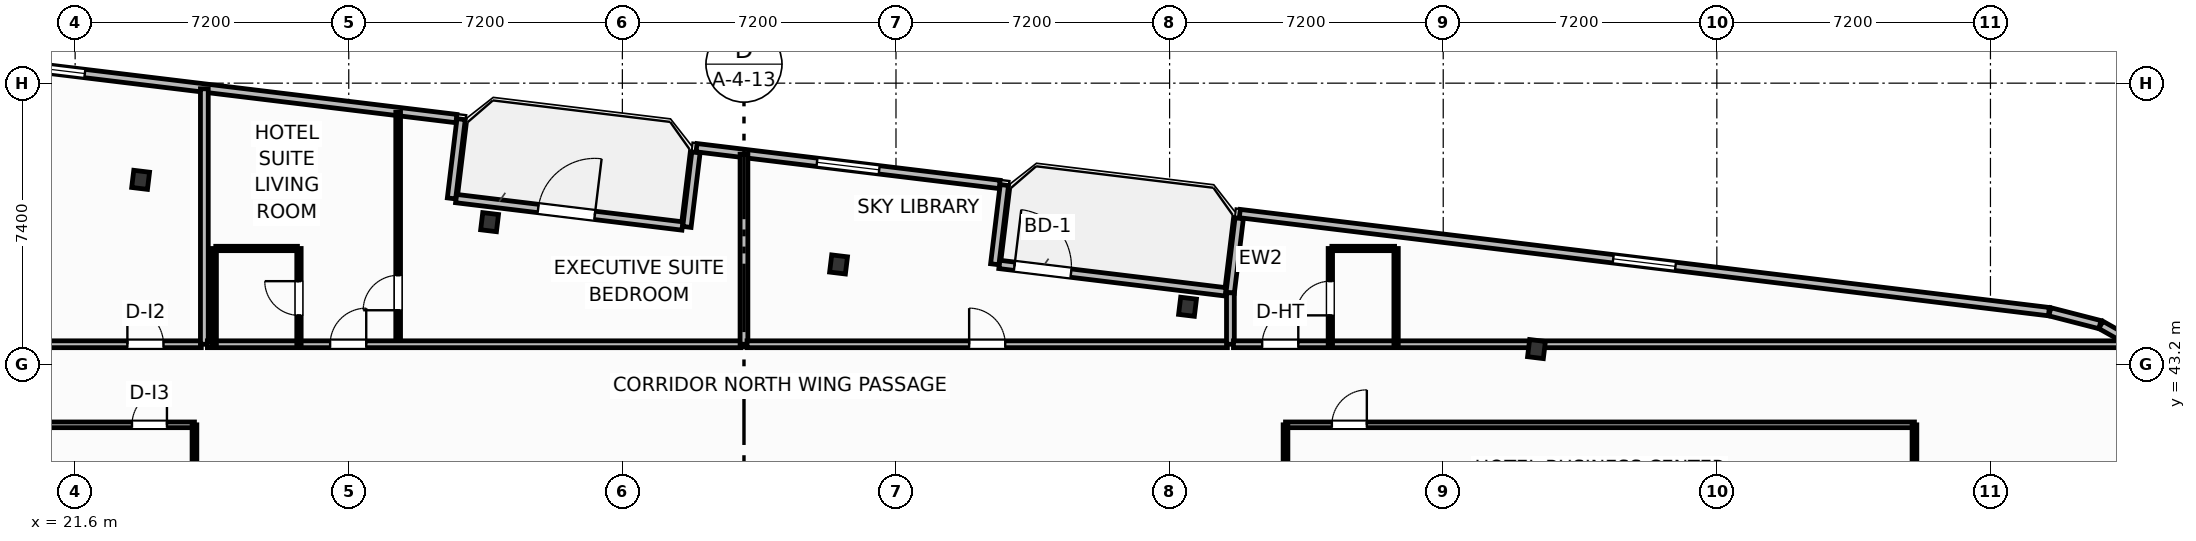
"""IFC4 building model, lengths in metres.
Left out: names, types, materials, properties, quantities, classifications, styles, units other than length and angle.
Written with IfcOpenShell. Run it as: python <this file> out.ifc"""

import sys

from ifc_helpers import new_model, si_unit, direction, frame, frame_2d, origin, origin_2d, place, context, subcontext, project, spatial, rectangle, i_section, extrude, element, fill, save


model = new_model("IFC4")
c1 = context("Model", 3, precision=1e-05, world=origin(), true_north=direction((0.0, 1.0)))
c2 = subcontext(c1, "Body", "Model", "MODEL_VIEW")
j1 = project(units=[si_unit("LENGTHUNIT", "METRE"), si_unit("PLANEANGLEUNIT", "RADIAN")], contexts=[c1])
p1 = place(None, origin())
s1 = spatial("IfcSite", under=j1, at=p1, CompositionType="ELEMENT")
p2 = place(p1, origin())
s2 = spatial("IfcBuilding", under=s1, at=p2, CompositionType="ELEMENT")
p3 = place(p2, frame((0.0, 0.0, 143.9)))
s3 = spatial("IfcBuildingStorey", under=s2, at=p3, CompositionType="ELEMENT", Elevation=143.9)
for number, where, z_axis, x_axis in (
    (1, (60.054, 43.603, 0.0), (0.0, 0.0, 1.0), (0.993, -0.12, 0.0)),
    (2, (50.872, 44.717, 0.0), (0.0, 0.0, 1.0), (0.993, -0.12, 0.0)),
    (3, (41.689, 45.83, 0.0), (0.0, 0.0, 1.0), (0.993, -0.12, 0.0)),
    (4, (32.506, 46.943, 0.0), (0.0, 0.0, 1.0), (0.993, -0.12, 0.0)),
    (5, (23.323, 48.056, 0.0), (0.0, 0.0, 1.0), (0.993, -0.12, 0.0)),
):
    element("IfcColumn", number, at=place(p3, frame(where, z_axis=z_axis, x_axis=x_axis)), inside=s3, PredefinedType="COLUMN", context=c2, shape_type="SweptSolid", body=[
        extrude(i_section(OverallWidth=0.418, OverallDepth=0.455, WebThickness=0.042, FlangeThickness=0.068, FilletRadius=0.025, at=origin_2d()), origin(), (0.0, 0.0, 1.0), 3.7),
    ])
p4 = place(p3, frame((31.624, 47.563, 0.0), z_axis=(0.0, 0.0, 1.0), x_axis=(0.992729951822, -0.120362962556, 0.0)))
e6 = element("IfcWall", 6, at=p4, inside=s3, PredefinedType="SOLIDWALL", context=c2, shape_type="SweptSolid", body=[
    extrude(rectangle(XDim=6.0, YDim=0.22, at=frame_2d((3.0, 0.0))), origin(), (0.0, 0.0, 1.0), 2.73),
])
p5 = place(p4, frame((2.176, 0.0, 0.0)))
e7 = element("IfcOpeningElement", 7, at=p5, cuts=e6, PredefinedType="OPENING", context=c2, shape_type="SweptSolid", body=[
    extrude(rectangle(XDim=1.5, YDim=2.25, at=frame_2d((0.75, 1.125))), frame((0.0, 0.12, 0.0), z_axis=(0.0, -1.0, 0.0), x_axis=(1.0, 0.0, 0.0)), (0.0, 0.0, 1.0), 0.24),
])
p6 = place(p3, frame((45.92, 45.831, 0.0), z_axis=(0.0, 0.0, 1.0), x_axis=(0.992729951822, -0.120362962556, 0.0)))
e8 = element("IfcWall", 8, at=p6, inside=s3, PredefinedType="SOLIDWALL", context=c2, shape_type="SweptSolid", body=[
    extrude(rectangle(XDim=6.0, YDim=0.22, at=frame_2d((3.0, 0.0))), origin(), (0.0, 0.0, 1.0), 2.73),
])
p7 = place(p6, frame((0.4, 0.0, 0.0)))
e9 = element("IfcOpeningElement", 9, at=p7, cuts=e8, PredefinedType="OPENING", context=c2, shape_type="SweptSolid", body=[
    extrude(rectangle(XDim=1.5, YDim=2.25, at=frame_2d((0.75, 1.125))), frame((0.0, 0.12, 0.0), z_axis=(0.0, -1.0, 0.0), x_axis=(1.0, 0.0, 0.0)), (0.0, 0.0, 1.0), 0.24),
])
p8 = place(p3, frame((76.084, 43.575, 0.0), z_axis=(0.0, 0.0, 1.0), x_axis=(-0.871093268227, 0.491117621399, 0.0)))
e10 = element("IfcWall", 10, at=p8, inside=s3, PredefinedType="SOLIDWALL", context=c2, shape_type="SweptSolid", body=[
    extrude(rectangle(XDim=1.353, YDim=0.22, at=frame_2d((0.677, 0.0))), origin(), (0.0, 0.0, 1.0), 2.73),
])
p9 = place(p3, frame((74.881, 44.246, 0.0), z_axis=(0.0, 0.0, 1.0), x_axis=(-0.968549775063, 0.248819881091, 0.0)))
e11 = element("IfcWall", 11, at=p9, inside=s3, PredefinedType="SOLIDWALL", context=c2, shape_type="SweptSolid", body=[
    extrude(rectangle(XDim=1.361, YDim=0.22, at=frame_2d((0.68, 0.0))), origin(), (0.0, 0.0, 1.0), 2.73),
])
p10 = place(p3, frame((73.538, 44.588, 0.0), z_axis=(0.0, 0.0, 1.0), x_axis=(-0.992733493583, 0.120333747213, 0.0)))
e12 = element("IfcWall", 12, at=p10, inside=s3, PredefinedType="SOLIDWALL", context=c2, shape_type="SweptSolid", body=[
    extrude(rectangle(XDim=21.447, YDim=0.22, at=frame_2d((10.724, 0.0))), origin(), (0.0, 0.0, 1.0), 2.73),
])
p11 = place(p10, frame((9.899, 0.0, 0.8)))
e13 = element("IfcOpeningElement", 13, at=p11, cuts=e12, PredefinedType="OPENING", context=c2, shape_type="SweptSolid", body=[
    extrude(rectangle(XDim=1.65, YDim=1.65, at=frame_2d((0.825, 0.825))), frame((0.0, 0.12, 0.0), z_axis=(0.0, -1.0, 0.0), x_axis=(1.0, 0.0, 0.0)), (0.0, 0.0, 1.0), 0.24),
])
p12 = place(p3, frame((52.231, 47.045, 0.0), z_axis=(0.0, 0.0, 1.0), x_axis=(-0.120275992932, -0.992740492538, 0.0)))
e14 = element("IfcWall", 14, at=p12, inside=s3, PredefinedType="SOLIDWALL", context=c2, shape_type="SweptSolid", body=[
    extrude(rectangle(XDim=1.975, YDim=0.22, at=frame_2d((0.988, 0.0))), origin(), (0.0, 0.0, 1.0), 2.73),
])
p13 = place(p3, frame((45.799, 45.835, 0.0), z_axis=(0.0, 0.0, 1.0), x_axis=(0.120314009587, 0.992735885871, 0.0)))
e15 = element("IfcWall", 15, at=p13, inside=s3, PredefinedType="SOLIDWALL", context=c2, shape_type="SweptSolid", body=[
    extrude(rectangle(XDim=2.1, YDim=0.22, at=frame_2d((1.05, 0.0))), origin(), (0.0, 0.0, 1.0), 2.73),
])
p14 = place(p3, frame((45.928, 47.935, 0.0), z_axis=(0.0, 0.0, 1.0), x_axis=(-0.992730591876, 0.120357683402, 0.0)))
e16 = element("IfcWall", 16, at=p14, inside=s3, PredefinedType="SOLIDWALL", context=c2, shape_type="SweptSolid", body=[
    extrude(rectangle(XDim=8.035, YDim=0.22, at=frame_2d((4.017, 0.0))), origin(), (0.0, 0.0, 1.0), 2.73),
])
p15 = place(p14, frame((3.192, 0.0, 0.8)))
e17 = element("IfcOpeningElement", 17, at=p15, cuts=e16, PredefinedType="OPENING", context=c2, shape_type="SweptSolid", body=[
    extrude(rectangle(XDim=1.65, YDim=1.65, at=frame_2d((0.825, 0.825))), frame((0.0, 0.12, 0.0), z_axis=(0.0, -1.0, 0.0), x_axis=(1.0, 0.0, 0.0)), (0.0, 0.0, 1.0), 0.24),
])
p16 = place(p3, frame((37.936, 48.778, 0.0), z_axis=(0.0, 0.0, 1.0), x_axis=(-0.120397815541, -0.992725725472, 0.0)))
e18 = element("IfcWall", 18, at=p16, inside=s3, PredefinedType="SOLIDWALL", context=c2, shape_type="SweptSolid", body=[
    extrude(rectangle(XDim=1.975, YDim=0.22, at=frame_2d((0.988, 0.0))), origin(), (0.0, 0.0, 1.0), 2.73),
])
p17 = place(p3, frame((31.504, 47.568, 0.0), z_axis=(0.0, 0.0, 1.0), x_axis=(0.120341784665, 0.992732519294, 0.0)))
e19 = element("IfcWall", 19, at=p17, inside=s3, PredefinedType="SOLIDWALL", context=c2, shape_type="SweptSolid", body=[
    extrude(rectangle(XDim=2.1, YDim=0.22, at=frame_2d((1.05, 0.0))), origin(), (0.0, 0.0, 1.0), 2.73),
])
p18 = place(p3, frame((31.633, 49.668, 0.0), z_axis=(0.0, 0.0, 1.0), x_axis=(-0.992731670483, 0.120348786531, 0.0)))
e20 = element("IfcWall", 20, at=p18, inside=s3, PredefinedType="SOLIDWALL", context=c2, shape_type="SweptSolid", body=[
    extrude(rectangle(XDim=21.347, YDim=0.22, at=frame_2d((10.674, 0.0))), origin(), (0.0, 0.0, 1.0), 2.73),
])
p19 = place(p18, frame((9.849, 0.0, 0.8)))
e21 = element("IfcOpeningElement", 21, at=p19, cuts=e20, PredefinedType="OPENING", context=c2, shape_type="SweptSolid", body=[
    extrude(rectangle(XDim=1.65, YDim=1.65, at=frame_2d((0.825, 0.825))), frame((0.0, 0.12, 0.0), z_axis=(0.0, -1.0, 0.0), x_axis=(1.0, 0.0, 0.0)), (0.0, 0.0, 1.0), 0.24),
])
p20 = place(p3, frame((5.0, 41.61, 0.0), z_axis=(0.0, 0.0, 1.0), x_axis=(1.0, 0.0, 0.0)))
e22 = element("IfcWall", 22, at=p20, inside=s3, PredefinedType="PARTITIONING", context=c2, shape_type="SweptSolid", body=[
    extrude(rectangle(XDim=19.74, YDim=0.15, at=frame_2d((9.87, 0.0))), origin(), (0.0, 0.0, 1.0), 3.45),
])
p21 = place(p20, frame((18.096, 0.0, 0.0)))
e23 = element("IfcOpeningElement", 23, at=p21, cuts=e22, PredefinedType="OPENING", context=c2, shape_type="SweptSolid", body=[
    extrude(rectangle(XDim=0.92, YDim=2.05, at=frame_2d((0.46, 1.025))), frame((0.0, 0.085, 0.0), z_axis=(0.0, -1.0, 0.0), x_axis=(1.0, 0.0, 0.0)), (0.0, 0.0, 1.0), 0.17),
])
p22 = place(p3, frame((24.74, 39.3, 0.0), z_axis=(0.0, 0.0, 1.0), x_axis=(0.0, 1.0, 0.0)))
e24 = element("IfcWall", 24, at=p22, inside=s3, PredefinedType="PARTITIONING", context=c2, shape_type="SweptSolid", body=[
    extrude(rectangle(XDim=2.31, YDim=0.125, at=frame_2d((1.155, 0.0))), origin(), (0.0, 0.0, 1.0), 3.45),
])
p23 = place(p3, frame((53.45, 41.61, 0.0), z_axis=(0.0, 0.0, 1.0), x_axis=(1.0, 0.0, 0.0)))
e25 = element("IfcWall", 25, at=p23, inside=s3, PredefinedType="PARTITIONING", context=c2, shape_type="SweptSolid", body=[
    extrude(rectangle(XDim=16.55, YDim=0.15, at=frame_2d((8.275, 0.0))), origin(), (0.0, 0.0, 1.0), 3.45),
])
p24 = place(p23, frame((1.22, 0.0, 0.0)))
e26 = element("IfcOpeningElement", 26, at=p24, cuts=e25, PredefinedType="OPENING", context=c2, shape_type="SweptSolid", body=[
    extrude(rectangle(XDim=0.92, YDim=2.05, at=frame_2d((0.46, 1.025))), frame((0.0, 0.085, 0.0), z_axis=(0.0, -1.0, 0.0), x_axis=(1.0, 0.0, 0.0)), (0.0, 0.0, 1.0), 0.17),
])
for number, where, z_axis, x_axis in (
    (27, (53.45, 39.3, 0.0), (0.0, 0.0, 1.0), (0.0, 1.0, 0.0)),
    (28, (70.0, 39.3, 0.0), (0.0, 0.0, 1.0), (0.0, 1.0, 0.0)),
):
    element("IfcWall", number, at=place(p3, frame(where, z_axis=z_axis, x_axis=x_axis)), inside=s3, PredefinedType="PARTITIONING", context=c2, shape_type="SweptSolid", body=[
        extrude(rectangle(XDim=2.31, YDim=0.125, at=frame_2d((1.155, 0.0))), origin(), (0.0, 0.0, 1.0), 3.45),
    ])
p25 = place(p3, frame((4.143, 43.73, 0.0), z_axis=(0.0, 0.0, 1.0), x_axis=(1.0, 0.0, 0.0)))
e29 = element("IfcWall", 29, at=p25, inside=s3, PredefinedType="PARTITIONING", context=c2, shape_type="SweptSolid", body=[
    extrude(rectangle(XDim=20.777, YDim=0.18, at=frame_2d((10.389, 0.0))), origin(), (0.0, 0.0, 1.0), 3.45),
])
p26 = place(p25, frame((18.832, 0.0, 0.0)))
e30 = element("IfcOpeningElement", 30, at=p26, cuts=e29, PredefinedType="OPENING", context=c2, shape_type="SweptSolid", body=[
    extrude(rectangle(XDim=0.95, YDim=2.05, at=frame_2d((0.475, 1.025))), frame((0.0, 0.1, 0.0), z_axis=(0.0, -1.0, 0.0), x_axis=(1.0, 0.0, 0.0)), (0.0, 0.0, 1.0), 0.2),
])
p27 = place(p3, frame((25.0, 43.73, 0.0), z_axis=(0.0, 0.0, 1.0), x_axis=(0.0, 1.0, 0.0)))
e31 = element("IfcWall", 31, at=p27, inside=s3, PredefinedType="PARTITIONING", context=c2, shape_type="SweptSolid", body=[
    extrude(rectangle(XDim=6.722, YDim=0.205, at=frame_2d((3.361, 0.0))), origin(), (0.0, 0.0, 1.0), 3.45),
])
p28 = place(p3, frame((30.1, 43.73, 0.0), z_axis=(0.0, 0.0, 1.0), x_axis=(0.0, 1.0, 0.0)))
e32 = element("IfcWall", 32, at=p28, inside=s3, PredefinedType="PARTITIONING", context=c2, shape_type="SweptSolid", body=[
    extrude(rectangle(XDim=6.104, YDim=0.125, at=frame_2d((3.052, 0.0))), origin(), (0.0, 0.0, 1.0), 3.45),
])
p29 = place(p28, frame((0.895, 0.0, 0.0)))
e33 = element("IfcOpeningElement", 33, at=p29, cuts=e32, PredefinedType="OPENING", context=c2, shape_type="SweptSolid", body=[
    extrude(rectangle(XDim=0.92, YDim=2.05, at=frame_2d((0.46, 1.025))), frame((0.0, 0.073, 0.0), z_axis=(0.0, -1.0, 0.0), x_axis=(1.0, 0.0, 0.0)), (0.0, 0.0, 1.0), 0.145),
])
p30 = place(p3, frame((25.08, 43.73, 0.0), z_axis=(0.0, 0.0, 1.0), x_axis=(1.0, 0.0, 0.0)))
e34 = element("IfcWall", 34, at=p30, inside=s3, PredefinedType="PARTITIONING", context=c2, shape_type="SweptSolid", body=[
    extrude(rectangle(XDim=14.04, YDim=0.18, at=frame_2d((7.02, 0.0))), origin(), (0.0, 0.0, 1.0), 2.972),
])
p31 = place(p30, frame((3.23, 0.0, 0.0)))
e35 = element("IfcOpeningElement", 35, at=p31, cuts=e34, PredefinedType="OPENING", context=c2, shape_type="SweptSolid", body=[
    extrude(rectangle(XDim=0.95, YDim=2.15, at=frame_2d((0.475, 1.075))), frame((0.0, 0.1, 0.0), z_axis=(0.0, -1.0, 0.0), x_axis=(1.0, 0.0, 0.0)), (0.0, 0.0, 1.0), 0.2),
])
p32 = place(p3, frame((25.3, 46.25, 0.0), z_axis=(0.0, 0.0, 1.0), x_axis=(1.0, 0.0, 0.0)))
e36 = element("IfcWall", 36, at=p32, inside=s3, PredefinedType="PARTITIONING", context=c2, shape_type="SweptSolid", body=[
    extrude(rectangle(XDim=2.15, YDim=0.115, at=frame_2d((1.075, 0.0))), origin(), (0.0, 0.0, 1.0), 3.45),
])
p33 = place(p3, frame((27.49, 43.73, 0.0), z_axis=(0.0, 0.0, 1.0), x_axis=(0.0, 1.0, 0.0)))
e37 = element("IfcWall", 37, at=p33, inside=s3, PredefinedType="PARTITIONING", context=c2, shape_type="SweptSolid", body=[
    extrude(rectangle(XDim=2.52, YDim=0.115, at=frame_2d((1.26, 0.0))), origin(), (0.0, 0.0, 1.0), 3.45),
])
p34 = place(p33, frame((0.76, 0.0, 0.0)))
e38 = element("IfcOpeningElement", 38, at=p34, cuts=e37, PredefinedType="OPENING", context=c2, shape_type="SweptSolid", body=[
    extrude(rectangle(XDim=0.9, YDim=2.05, at=frame_2d((0.45, 1.025))), frame((0.0, 0.067, 0.0), z_axis=(0.0, -1.0, 0.0), x_axis=(1.0, 0.0, 0.0)), (0.0, 0.0, 1.0), 0.135),
])
p35 = place(p3, frame((25.26, 43.73, 0.0), z_axis=(0.0, 0.0, 1.0), x_axis=(0.0, 1.0, 0.0)))
e39 = element("IfcWall", 39, at=p35, inside=s3, PredefinedType="PARTITIONING", context=c2, shape_type="SweptSolid", body=[
    extrude(rectangle(XDim=2.52, YDim=0.115, at=frame_2d((1.26, 0.0))), origin(), (0.0, 0.0, 1.0), 3.45),
])
p36 = place(p3, frame((39.2, 43.73, 0.0), z_axis=(0.0, 0.0, 1.0), x_axis=(0.0, 1.0, 0.0)))
e40 = element("IfcWall", 40, at=p36, inside=s3, PredefinedType="PARTITIONING", context=c2, shape_type="SweptSolid", body=[
    extrude(rectangle(XDim=5.0, YDim=0.205, at=frame_2d((2.5, 0.0))), origin(), (0.0, 0.0, 1.0), 3.45),
])
p37 = place(p3, frame((39.28, 43.73, 0.0), z_axis=(0.0, 0.0, 1.0), x_axis=(1.0, 0.0, 0.0)))
e41 = element("IfcWall", 41, at=p37, inside=s3, PredefinedType="PARTITIONING", context=c2, shape_type="SweptSolid", body=[
    extrude(rectangle(XDim=12.64, YDim=0.18, at=frame_2d((6.32, 0.0))), origin(), (0.0, 0.0, 1.0), 2.972),
])
p38 = place(p37, frame((5.845, 0.0, 0.0)))
e42 = element("IfcOpeningElement", 42, at=p38, cuts=e41, PredefinedType="OPENING", context=c2, shape_type="SweptSolid", body=[
    extrude(rectangle(XDim=0.95, YDim=2.05, at=frame_2d((0.475, 1.025))), frame((0.0, 0.1, 0.0), z_axis=(0.0, -1.0, 0.0), x_axis=(1.0, 0.0, 0.0)), (0.0, 0.0, 1.0), 0.2),
])
p39 = place(p3, frame((52.0, 43.73, 0.0), z_axis=(0.0, 0.0, 1.0), x_axis=(0.0, 1.0, 0.0)))
e43 = element("IfcWall", 43, at=p39, inside=s3, PredefinedType="PARTITIONING", context=c2, shape_type="SweptSolid", body=[
    extrude(rectangle(XDim=1.354, YDim=0.205, at=frame_2d((0.677, 0.0))), origin(), (0.0, 0.0, 1.0), 3.45),
])
p40 = place(p3, frame((52.08, 43.73, 0.0), z_axis=(0.0, 0.0, 1.0), x_axis=(1.0, 0.0, 0.0)))
e44 = element("IfcWall", 44, at=p40, inside=s3, PredefinedType="PARTITIONING", context=c2, shape_type="SweptSolid", body=[
    extrude(rectangle(XDim=23.689, YDim=0.18, at=frame_2d((11.845, 0.0))), origin(), (0.0, 0.0, 1.0), 2.824),
])
p41 = place(p40, frame((0.756, 0.0, 0.0)))
e45 = element("IfcOpeningElement", 45, at=p41, cuts=e44, PredefinedType="OPENING", context=c2, shape_type="SweptSolid", body=[
    extrude(rectangle(XDim=0.95, YDim=2.15, at=frame_2d((0.475, 1.075))), frame((0.0, 0.1, 0.0), z_axis=(0.0, -1.0, 0.0), x_axis=(1.0, 0.0, 0.0)), (0.0, 0.0, 1.0), 0.2),
])
p42 = place(p3, frame((54.67, 46.25, 0.0), z_axis=(0.0, 0.0, 1.0), x_axis=(1.0, 0.0, 0.0)))
e46 = element("IfcWall", 46, at=p42, inside=s3, PredefinedType="PARTITIONING", context=c2, shape_type="SweptSolid", body=[
    extrude(rectangle(XDim=1.65, YDim=0.115, at=frame_2d((0.825, 0.0))), origin(), (0.0, 0.0, 1.0), 3.45),
])
p43 = place(p3, frame((54.63, 43.73, 0.0), z_axis=(0.0, 0.0, 1.0), x_axis=(0.0, 1.0, 0.0)))
e47 = element("IfcWall", 47, at=p43, inside=s3, PredefinedType="PARTITIONING", context=c2, shape_type="SweptSolid", body=[
    extrude(rectangle(XDim=2.52, YDim=0.115, at=frame_2d((1.26, 0.0))), origin(), (0.0, 0.0, 1.0), 3.45),
])
p44 = place(p43, frame((0.76, 0.0, 0.0)))
e48 = element("IfcOpeningElement", 48, at=p44, cuts=e47, PredefinedType="OPENING", context=c2, shape_type="SweptSolid", body=[
    extrude(rectangle(XDim=0.9, YDim=2.05, at=frame_2d((0.45, 1.025))), frame((0.0, 0.067, 0.0), z_axis=(0.0, -1.0, 0.0), x_axis=(1.0, 0.0, 0.0)), (0.0, 0.0, 1.0), 0.135),
])
p45 = place(p3, frame((56.36, 43.73, 0.0), z_axis=(0.0, 0.0, 1.0), x_axis=(0.0, 1.0, 0.0)))
e49 = element("IfcWall", 49, at=p45, inside=s3, PredefinedType="PARTITIONING", context=c2, shape_type="SweptSolid", body=[
    extrude(rectangle(XDim=2.52, YDim=0.115, at=frame_2d((1.26, 0.0))), origin(), (0.0, 0.0, 1.0), 3.45),
])
p46 = place(p5, origin())
e50 = element("IfcDoor", 50, at=p46, inside=s3, OperationType="SINGLE_SWING_RIGHT", PredefinedType="DOOR", context=c2, shape_type="SweptSolid", body=[
    extrude(rectangle(XDim=1.5, YDim=2.25, at=frame_2d((0.75, 1.125))), frame((0.0, 0.025, 0.0), z_axis=(0.0, -1.0, 0.0), x_axis=(1.0, 0.0, 0.0)), (0.0, 0.0, 1.0), 0.05),
])
fill(e7, e50)
p47 = place(p7, origin())
e51 = element("IfcDoor", 51, at=p47, inside=s3, OperationType="SINGLE_SWING_LEFT", PredefinedType="DOOR", context=c2, shape_type="SweptSolid", body=[
    extrude(rectangle(XDim=1.5, YDim=2.25, at=frame_2d((0.75, 1.125))), frame((0.0, 0.025, 0.0), z_axis=(0.0, -1.0, 0.0), x_axis=(1.0, 0.0, 0.0)), (0.0, 0.0, 1.0), 0.05),
])
fill(e9, e51)
p48 = place(p11, origin())
e52 = element("IfcWindow", 52, at=p48, inside=s3, PartitioningType="SINGLE_PANEL", PredefinedType="WINDOW", context=c2, shape_type="SweptSolid", body=[
    extrude(rectangle(XDim=1.65, YDim=1.65, at=frame_2d((0.825, 0.825))), frame((0.0, 0.03, 0.0), z_axis=(0.0, -1.0, 0.0), x_axis=(1.0, 0.0, 0.0)), (0.0, 0.0, 1.0), 0.06),
])
fill(e13, e52)
p49 = place(p15, origin())
e53 = element("IfcWindow", 53, at=p49, inside=s3, PartitioningType="SINGLE_PANEL", PredefinedType="WINDOW", context=c2, shape_type="SweptSolid", body=[
    extrude(rectangle(XDim=1.65, YDim=1.65, at=frame_2d((0.825, 0.825))), frame((0.0, 0.03, 0.0), z_axis=(0.0, -1.0, 0.0), x_axis=(1.0, 0.0, 0.0)), (0.0, 0.0, 1.0), 0.06),
])
fill(e17, e53)
p50 = place(p19, origin())
e54 = element("IfcWindow", 54, at=p50, inside=s3, PartitioningType="SINGLE_PANEL", PredefinedType="WINDOW", context=c2, shape_type="SweptSolid", body=[
    extrude(rectangle(XDim=1.65, YDim=1.65, at=frame_2d((0.825, 0.825))), frame((0.0, 0.03, 0.0), z_axis=(0.0, -1.0, 0.0), x_axis=(1.0, 0.0, 0.0)), (0.0, 0.0, 1.0), 0.06),
])
fill(e21, e54)
p51 = place(p21, origin())
e55 = element("IfcDoor", 55, at=p51, inside=s3, OperationType="SINGLE_SWING_RIGHT", PredefinedType="DOOR", context=c2, shape_type="SweptSolid", body=[
    extrude(rectangle(XDim=0.92, YDim=2.05, at=frame_2d((0.46, 1.025))), frame((0.0, 0.025, 0.0), z_axis=(0.0, -1.0, 0.0), x_axis=(1.0, 0.0, 0.0)), (0.0, 0.0, 1.0), 0.05),
])
fill(e23, e55)
p52 = place(p24, origin())
e56 = element("IfcDoor", 56, at=p52, inside=s3, OperationType="SINGLE_SWING_RIGHT", PredefinedType="DOOR", context=c2, shape_type="SweptSolid", body=[
    extrude(rectangle(XDim=0.92, YDim=2.05, at=frame_2d((0.46, 1.025))), frame((0.0, 0.025, 0.0), z_axis=(0.0, -1.0, 0.0), x_axis=(1.0, 0.0, 0.0)), (0.0, 0.0, 1.0), 0.05),
])
fill(e26, e56)
p53 = place(p26, origin())
e57 = element("IfcDoor", 57, at=p53, inside=s3, OperationType="SINGLE_SWING_LEFT", PredefinedType="DOOR", context=c2, shape_type="SweptSolid", body=[
    extrude(rectangle(XDim=0.95, YDim=2.05, at=frame_2d((0.475, 1.025))), frame((0.0, 0.025, 0.0), z_axis=(0.0, -1.0, 0.0), x_axis=(1.0, 0.0, 0.0)), (0.0, 0.0, 1.0), 0.05),
])
fill(e30, e57)
p54 = place(p29, origin())
e58 = element("IfcDoor", 58, at=p54, inside=s3, OperationType="SINGLE_SWING_LEFT", PredefinedType="DOOR", context=c2, shape_type="SweptSolid", body=[
    extrude(rectangle(XDim=0.92, YDim=2.05, at=frame_2d((0.46, 1.025))), frame((0.0, 0.025, 0.0), z_axis=(0.0, -1.0, 0.0), x_axis=(1.0, 0.0, 0.0)), (0.0, 0.0, 1.0), 0.05),
])
fill(e33, e58)
p55 = place(p31, origin())
e59 = element("IfcDoor", 59, at=p55, inside=s3, OperationType="SINGLE_SWING_RIGHT", PredefinedType="DOOR", context=c2, shape_type="SweptSolid", body=[
    extrude(rectangle(XDim=0.95, YDim=2.15, at=frame_2d((0.475, 1.075))), frame((0.0, 0.025, 0.0), z_axis=(0.0, -1.0, 0.0), x_axis=(1.0, 0.0, 0.0)), (0.0, 0.0, 1.0), 0.05),
])
fill(e35, e59)
p56 = place(p34, origin())
e60 = element("IfcDoor", 60, at=p56, inside=s3, OperationType="SINGLE_SWING_RIGHT", PredefinedType="DOOR", context=c2, shape_type="SweptSolid", body=[
    extrude(rectangle(XDim=0.9, YDim=2.05, at=frame_2d((0.45, 1.025))), frame((0.0, 0.025, 0.0), z_axis=(0.0, -1.0, 0.0), x_axis=(1.0, 0.0, 0.0)), (0.0, 0.0, 1.0), 0.05),
])
fill(e38, e60)
p57 = place(p38, origin())
e61 = element("IfcDoor", 61, at=p57, inside=s3, OperationType="SINGLE_SWING_LEFT", PredefinedType="DOOR", context=c2, shape_type="SweptSolid", body=[
    extrude(rectangle(XDim=0.95, YDim=2.05, at=frame_2d((0.475, 1.025))), frame((0.0, 0.025, 0.0), z_axis=(0.0, -1.0, 0.0), x_axis=(1.0, 0.0, 0.0)), (0.0, 0.0, 1.0), 0.05),
])
fill(e42, e61)
p58 = place(p41, origin())
e62 = element("IfcDoor", 62, at=p58, inside=s3, OperationType="SINGLE_SWING_RIGHT", PredefinedType="DOOR", context=c2, shape_type="SweptSolid", body=[
    extrude(rectangle(XDim=0.95, YDim=2.15, at=frame_2d((0.475, 1.075))), frame((0.0, 0.025, 0.0), z_axis=(0.0, -1.0, 0.0), x_axis=(1.0, 0.0, 0.0)), (0.0, 0.0, 1.0), 0.05),
])
fill(e45, e62)
p59 = place(p44, origin())
e63 = element("IfcDoor", 63, at=p59, inside=s3, OperationType="SINGLE_SWING_LEFT", PredefinedType="DOOR", context=c2, shape_type="SweptSolid", body=[
    extrude(rectangle(XDim=0.9, YDim=2.05, at=frame_2d((0.45, 1.025))), frame((0.0, 0.025, 0.0), z_axis=(0.0, -1.0, 0.0), x_axis=(1.0, 0.0, 0.0)), (0.0, 0.0, 1.0), 0.05),
])
fill(e48, e63)
save(model, sys.argv[1])
